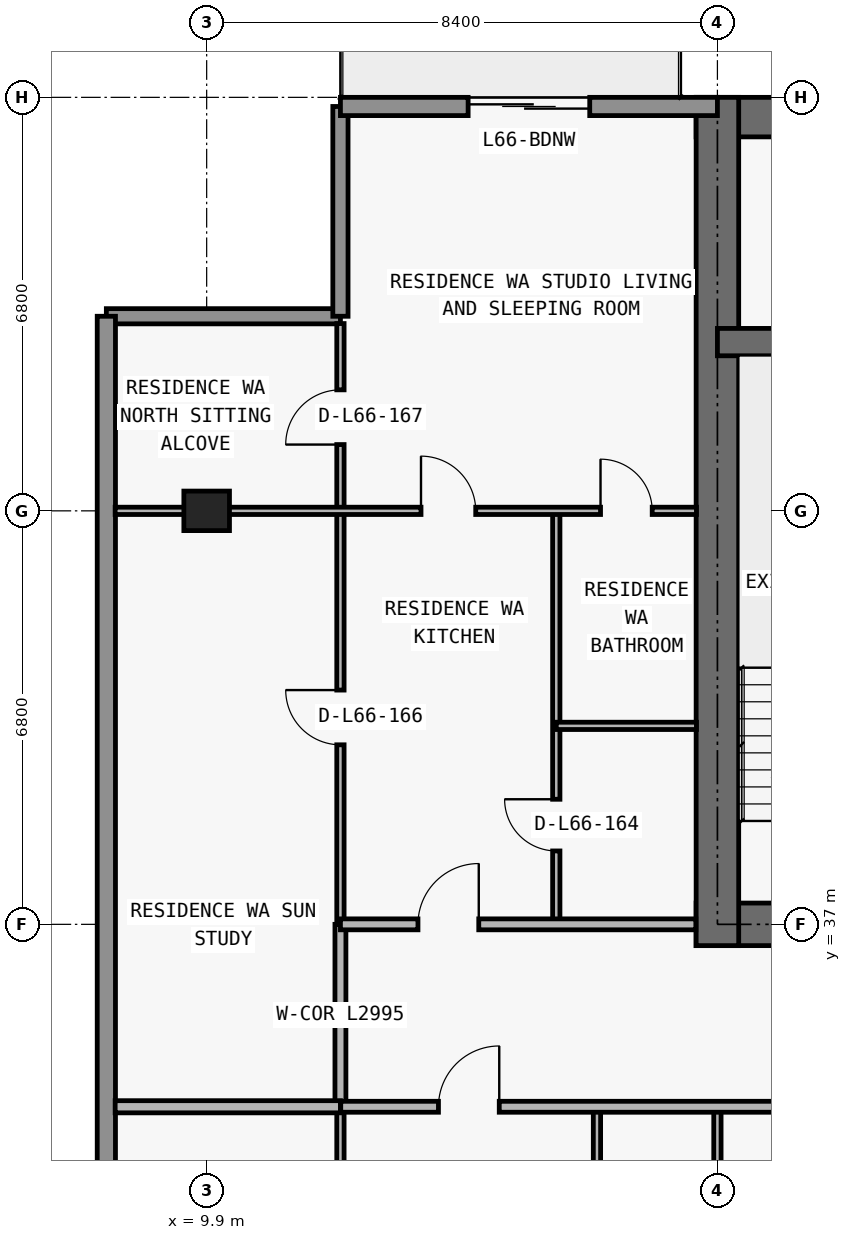
"""IFC4 building model, lengths in metres.
Left out: names, types, materials, properties, quantities, classifications, styles, units other than length and angle.
Written with IfcOpenShell. Run it as: python <this file> out.ifc"""

import sys

from ifc_helpers import new_model, si_unit, direction, frame, frame_2d, origin, origin_2d, place, context, subcontext, project, spatial, rectangle, extrude, element, fill, save


model = new_model("IFC4")
c1 = context("Model", 3, precision=1e-05, world=origin(), true_north=direction((0.0, 1.0)))
c2 = subcontext(c1, "Body", "Model", "MODEL_VIEW")
j1 = project(units=[si_unit("LENGTHUNIT", "METRE"), si_unit("PLANEANGLEUNIT", "RADIAN")], contexts=[c1])
p1 = place(None, origin())
s1 = spatial("IfcSite", under=j1, at=p1, CompositionType="ELEMENT")
p2 = place(p1, origin())
s2 = spatial("IfcBuilding", under=s1, at=p2, CompositionType="ELEMENT")
p3 = place(p2, frame((0.0, 0.0, 236.4)))
s3 = spatial("IfcBuildingStorey", under=s2, at=p3, CompositionType="ELEMENT", Elevation=236.4)
p4 = place(p3, frame((9.9, 43.8, 0.0), z_axis=(0.0, 0.0, 1.0), x_axis=(1.0, 0.0, 0.0)))
e1 = element("IfcColumn", 1, at=p4, inside=s3, PredefinedType="COLUMN", context=c2, shape_type="SweptSolid", body=[
    extrude(rectangle(XDim=0.75, YDim=0.65, at=origin_2d()), origin(), (0.0, 0.0, 1.0), 3.05),
])
p5 = place(p3, frame((17.95, 37.0, 0.0), z_axis=(0.0, 0.0, 1.0), x_axis=(1.0, 0.0, 0.0)))
e2 = element("IfcWall", 2, at=p5, inside=s3, PredefinedType="SHEAR", context=c2, shape_type="SweptSolid", body=[
    extrude(rectangle(XDim=41.9, YDim=0.7, at=frame_2d((20.95, 0.0))), origin(), (0.0, 0.0, 1.0), 3.05),
])
p6 = place(p5, frame((14.35, 0.0, 0.0)))
e3 = element("IfcOpeningElement", 3, at=p6, cuts=e2, PredefinedType="OPENING", context=c2, shape_type="SweptSolid", body=[
    extrude(rectangle(XDim=1.1, YDim=2.15, at=frame_2d((0.55, 1.075))), frame((0.0, 0.36, 0.0), z_axis=(0.0, -1.0, 0.0), x_axis=(1.0, 0.0, 0.0)), (0.0, 0.0, 1.0), 0.72),
])
p7 = place(p5, frame((6.2, 0.0, 0.0)))
e4 = element("IfcOpeningElement", 4, at=p7, cuts=e2, PredefinedType="OPENING", context=c2, shape_type="SweptSolid", body=[
    extrude(rectangle(XDim=1.05, YDim=2.15, at=frame_2d((0.525, 1.075))), frame((0.0, 0.36, 0.0), z_axis=(0.0, -1.0, 0.0), x_axis=(1.0, 0.0, 0.0)), (0.0, 0.0, 1.0), 0.72),
])
p8 = place(p5, frame((34.7, 0.0, 0.0)))
e5 = element("IfcOpeningElement", 5, at=p8, cuts=e2, PredefinedType="OPENING", context=c2, shape_type="SweptSolid", body=[
    extrude(rectangle(XDim=1.05, YDim=2.15, at=frame_2d((0.525, 1.075))), frame((0.0, 0.36, 0.0), z_axis=(0.0, -1.0, 0.0), x_axis=(1.0, 0.0, 0.0)), (0.0, 0.0, 1.0), 0.72),
])
p9 = place(p5, frame((10.812, 0.0, 0.0)))
e6 = element("IfcOpeningElement", 6, at=p9, cuts=e2, PredefinedType="OPENING", context=c2, shape_type="SweptSolid", body=[
    extrude(rectangle(XDim=1.05, YDim=2.15, at=frame_2d((0.525, 1.075))), frame((0.0, 0.36, 0.0), z_axis=(0.0, -1.0, 0.0), x_axis=(1.0, 0.0, 0.0)), (0.0, 0.0, 1.0), 0.72),
])
p10 = place(p5, frame((24.05, 0.0, 0.0)))
e7 = element("IfcOpeningElement", 7, at=p10, cuts=e2, PredefinedType="OPENING", context=c2, shape_type="SweptSolid", body=[
    extrude(rectangle(XDim=1.05, YDim=2.15, at=frame_2d((0.525, 1.075))), frame((0.0, 0.36, 0.0), z_axis=(0.0, -1.0, 0.0), x_axis=(1.0, 0.0, 0.0)), (0.0, 0.0, 1.0), 0.72),
])
p11 = place(p3, frame((17.95, 50.275, 0.0), z_axis=(0.0, 0.0, 1.0), x_axis=(1.0, 0.0, 0.0)))
e8 = element("IfcWall", 8, at=p11, inside=s3, PredefinedType="SHEAR", context=c2, shape_type="SweptSolid", body=[
    extrude(rectangle(XDim=41.9, YDim=0.65, at=frame_2d((20.95, 0.0))), origin(), (0.0, 0.0, 1.0), 3.05),
])
p12 = place(p3, frame((18.3, 36.65, 0.0), z_axis=(0.0, 0.0, 1.0), x_axis=(0.0, 1.0, 0.0)))
e9 = element("IfcWall", 9, at=p12, inside=s3, PredefinedType="SHEAR", context=c2, shape_type="SweptSolid", body=[
    extrude(rectangle(XDim=13.95, YDim=0.7, at=frame_2d((6.975, 0.0))), origin(), (0.0, 0.0, 1.0), 3.05),
])
p13 = place(p3, frame((18.3, 46.575, 0.0), z_axis=(0.0, 0.0, 1.0), x_axis=(1.0, 0.0, 0.0)))
e10 = element("IfcWall", 10, at=p13, inside=s3, PredefinedType="SHEAR", context=c2, shape_type="SweptSolid", body=[
    extrude(rectangle(XDim=41.2, YDim=0.45, at=frame_2d((20.6, 0.0))), origin(), (0.0, 0.0, 1.0), 3.05),
])
p14 = place(p13, frame((7.575, 0.0, 0.0)))
e11 = element("IfcOpeningElement", 11, at=p14, cuts=e10, PredefinedType="OPENING", context=c2, shape_type="SweptSolid", body=[
    extrude(rectangle(XDim=1.05, YDim=2.15, at=frame_2d((0.525, 1.075))), frame((0.0, 0.235, 0.0), z_axis=(0.0, -1.0, 0.0), x_axis=(1.0, 0.0, 0.0)), (0.0, 0.0, 1.0), 0.47),
])
p15 = place(p13, frame((32.625, 0.0, 0.0)))
e12 = element("IfcOpeningElement", 12, at=p15, cuts=e10, PredefinedType="OPENING", context=c2, shape_type="SweptSolid", body=[
    extrude(rectangle(XDim=1.05, YDim=2.15, at=frame_2d((0.525, 1.075))), frame((0.0, 0.235, 0.0), z_axis=(0.0, -1.0, 0.0), x_axis=(1.0, 0.0, 0.0)), (0.0, 0.0, 1.0), 0.47),
])
p16 = place(p3, frame((8.25, 47.0, 0.0), z_axis=(0.0, 0.0, 1.0), x_axis=(1.0, 0.0, 0.0)))
e13 = element("IfcWall", 13, at=p16, inside=s3, PredefinedType="ELEMENTEDWALL", context=c2, shape_type="SweptSolid", body=[
    extrude(rectangle(XDim=3.85, YDim=0.25, at=frame_2d((1.925, 0.0))), origin(), (0.0, 0.0, 1.0), 3.05),
])
p17 = place(p3, frame((12.1, 47.0, 0.0), z_axis=(0.0, 0.0, 1.0), x_axis=(0.0, 1.0, 0.0)))
e14 = element("IfcWall", 14, at=p17, inside=s3, PredefinedType="ELEMENTEDWALL", context=c2, shape_type="SweptSolid", body=[
    extrude(rectangle(XDim=3.45, YDim=0.25, at=frame_2d((1.725, 0.0))), origin(), (0.0, 0.0, 1.0), 3.05),
])
p18 = place(p3, frame((8.25, 30.15, 0.0), z_axis=(0.0, 0.0, 1.0), x_axis=(0.0, 1.0, 0.0)))
e15 = element("IfcWall", 15, at=p18, inside=s3, PredefinedType="STANDARD", context=c2, shape_type="SweptSolid", body=[
    extrude(rectangle(XDim=16.85, YDim=0.3, at=frame_2d((8.425, 0.0))), origin(), (0.0, 0.0, 1.0), 3.05),
])
p19 = place(p3, frame((12.1, 50.45, 0.0), z_axis=(0.0, 0.0, 1.0), x_axis=(1.0, 0.0, 0.0)))
e16 = element("IfcWall", 16, at=p19, inside=s3, PredefinedType="STANDARD", context=c2, shape_type="SweptSolid", body=[
    extrude(rectangle(XDim=6.2, YDim=0.3, at=frame_2d((3.1, 0.0))), origin(), (0.0, 0.0, 1.0), 3.05),
])
p20 = place(p19, frame((2.1, 0.0, 0.0)))
e17 = element("IfcOpeningElement", 17, at=p20, cuts=e16, PredefinedType="OPENING", context=c2, shape_type="SweptSolid", body=[
    extrude(rectangle(XDim=2.0, YDim=2.3, at=frame_2d((1.0, 1.15))), frame((0.0, 0.16, 0.0), z_axis=(0.0, -1.0, 0.0), x_axis=(1.0, 0.0, 0.0)), (0.0, 0.0, 1.0), 0.32),
])
p21 = place(p3, frame((12.1, 29.44, 0.0), z_axis=(0.0, 0.0, 1.0), x_axis=(0.0, 1.0, 0.0)))
e18 = element("IfcWall", 18, at=p21, inside=s3, PredefinedType="PARTITIONING", context=c2, shape_type="SweptSolid", body=[
    extrude(rectangle(XDim=4.56, YDim=0.12, at=frame_2d((2.28, 0.0))), origin(), (0.0, 0.0, 1.0), 2.578),
])
p22 = place(p3, frame((12.1, 34.005, 0.0), z_axis=(0.0, 0.0, 1.0), x_axis=(0.0, 1.0, 0.0)))
e19 = element("IfcWall", 19, at=p22, inside=s3, PredefinedType="PARTITIONING", context=c2, shape_type="SweptSolid", body=[
    extrude(rectangle(XDim=2.995, YDim=0.18, at=frame_2d((1.498, 0.0))), origin(), (0.0, 0.0, 1.0), 2.578),
])
p23 = place(p3, frame((12.1, 37.005, 0.0), z_axis=(0.0, 0.0, 1.0), x_axis=(0.0, 1.0, 0.0)))
e20 = element("IfcWall", 20, at=p23, inside=s3, PredefinedType="PARTITIONING", context=c2, shape_type="SweptSolid", body=[
    extrude(rectangle(XDim=9.875, YDim=0.12, at=frame_2d((4.938, 0.0))), origin(), (0.0, 0.0, 1.0), 2.578),
])
p24 = place(p23, frame((2.948, 0.0, 0.0)))
e21 = element("IfcOpeningElement", 21, at=p24, cuts=e20, PredefinedType="OPENING", context=c2, shape_type="SweptSolid", body=[
    extrude(rectangle(XDim=0.9, YDim=2.15, at=frame_2d((0.45, 1.075))), frame((0.0, 0.07, 0.0), z_axis=(0.0, -1.0, 0.0), x_axis=(1.0, 0.0, 0.0)), (0.0, 0.0, 1.0), 0.14),
])
p25 = place(p23, frame((7.885, 0.0, 0.0)))
e22 = element("IfcOpeningElement", 22, at=p25, cuts=e20, PredefinedType="OPENING", context=c2, shape_type="SweptSolid", body=[
    extrude(rectangle(XDim=0.9, YDim=2.15, at=frame_2d((0.45, 1.075))), frame((0.0, 0.07, 0.0), z_axis=(0.0, -1.0, 0.0), x_axis=(1.0, 0.0, 0.0)), (0.0, 0.0, 1.0), 0.14),
])
p26 = place(p3, frame((15.65, 37.0, 0.0), z_axis=(0.0, 0.0, 1.0), x_axis=(0.0, 1.0, 0.0)))
e23 = element("IfcWall", 23, at=p26, inside=s3, PredefinedType="PARTITIONING", context=c2, shape_type="SweptSolid", body=[
    extrude(rectangle(XDim=6.8, YDim=0.12, at=frame_2d((3.4, 0.0))), origin(), (0.0, 0.0, 1.0), 3.05),
])
p27 = place(p26, frame((1.207, 0.0, 0.0)))
e24 = element("IfcOpeningElement", 24, at=p27, cuts=e23, PredefinedType="OPENING", context=c2, shape_type="SweptSolid", body=[
    extrude(rectangle(XDim=0.85, YDim=2.1, at=frame_2d((0.425, 1.05))), frame((0.0, 0.07, 0.0), z_axis=(0.0, -1.0, 0.0), x_axis=(1.0, 0.0, 0.0)), (0.0, 0.0, 1.0), 0.14),
])
p28 = place(p3, frame((16.319, 29.44, 0.0), z_axis=(0.0, 0.0, 1.0), x_axis=(0.0, 1.0, 0.0)))
e25 = element("IfcWall", 25, at=p28, inside=s3, PredefinedType="PARTITIONING", context=c2, shape_type="SweptSolid", body=[
    extrude(rectangle(XDim=4.56, YDim=0.12, at=frame_2d((2.28, 0.0))), origin(), (0.0, 0.0, 1.0), 3.05),
])
p29 = place(p28, frame((1.855, 0.0, 0.0)))
e26 = element("IfcOpeningElement", 26, at=p29, cuts=e25, PredefinedType="OPENING", context=c2, shape_type="SweptSolid", body=[
    extrude(rectangle(XDim=0.85, YDim=2.1, at=frame_2d((0.425, 1.05))), frame((0.0, 0.07, 0.0), z_axis=(0.0, -1.0, 0.0), x_axis=(1.0, 0.0, 0.0)), (0.0, 0.0, 1.0), 0.14),
])
p30 = place(p3, frame((18.3, 29.44, 0.0), z_axis=(0.0, 0.0, 1.0), x_axis=(0.0, 1.0, 0.0)))
e27 = element("IfcWall", 27, at=p30, inside=s3, PredefinedType="PARTITIONING", context=c2, shape_type="SweptSolid", body=[
    extrude(rectangle(XDim=4.56, YDim=0.12, at=frame_2d((2.28, 0.0))), origin(), (0.0, 0.0, 1.0), 2.263),
])
p31 = place(p3, frame((8.395, 34.0, 0.0), z_axis=(0.0, 0.0, 1.0), x_axis=(1.0, 0.0, 0.0)))
e28 = element("IfcWall", 28, at=p31, inside=s3, PredefinedType="PARTITIONING", context=c2, shape_type="SweptSolid", body=[
    extrude(rectangle(XDim=3.705, YDim=0.2, at=frame_2d((1.853, 0.0))), origin(), (0.0, 0.0, 1.0), 3.05),
])
p32 = place(p3, frame((12.105, 34.0, 0.0), z_axis=(0.0, 0.0, 1.0), x_axis=(1.0, 0.0, 0.0)))
e29 = element("IfcWall", 29, at=p32, inside=s3, PredefinedType="PARTITIONING", context=c2, shape_type="SweptSolid", body=[
    extrude(rectangle(XDim=53.595, YDim=0.18, at=frame_2d((26.797, 0.0))), origin(), (0.0, 0.0, 1.0), 3.05),
])
p33 = place(p32, frame((1.607, 0.0, 0.0)))
e30 = element("IfcOpeningElement", 30, at=p33, cuts=e29, PredefinedType="OPENING", context=c2, shape_type="SweptSolid", body=[
    extrude(rectangle(XDim=1.0, YDim=2.2, at=frame_2d((0.5, 1.1))), frame((0.0, 0.1, 0.0), z_axis=(0.0, -1.0, 0.0), x_axis=(1.0, 0.0, 0.0)), (0.0, 0.0, 1.0), 0.2),
])
p34 = place(p32, frame((17.057, 0.0, 0.0)))
e31 = element("IfcOpeningElement", 31, at=p34, cuts=e29, PredefinedType="OPENING", context=c2, shape_type="SweptSolid", body=[
    extrude(rectangle(XDim=1.0, YDim=2.2, at=frame_2d((0.5, 1.1))), frame((0.0, 0.1, 0.0), z_axis=(0.0, -1.0, 0.0), x_axis=(1.0, 0.0, 0.0)), (0.0, 0.0, 1.0), 0.2),
])
p35 = place(p32, frame((25.242, 0.0, 0.0)))
e32 = element("IfcOpeningElement", 32, at=p35, cuts=e29, PredefinedType="OPENING", context=c2, shape_type="SweptSolid", body=[
    extrude(rectangle(XDim=1.0, YDim=2.2, at=frame_2d((0.5, 1.1))), frame((0.0, 0.1, 0.0), z_axis=(0.0, -1.0, 0.0), x_axis=(1.0, 0.0, 0.0)), (0.0, 0.0, 1.0), 0.2),
])
p36 = place(p32, frame((33.092, 0.0, 0.0)))
e33 = element("IfcOpeningElement", 33, at=p36, cuts=e29, PredefinedType="OPENING", context=c2, shape_type="SweptSolid", body=[
    extrude(rectangle(XDim=1.0, YDim=2.2, at=frame_2d((0.5, 1.1))), frame((0.0, 0.1, 0.0), z_axis=(0.0, -1.0, 0.0), x_axis=(1.0, 0.0, 0.0)), (0.0, 0.0, 1.0), 0.2),
])
p37 = place(p32, frame((41.705, 0.0, 0.0)))
e34 = element("IfcOpeningElement", 34, at=p37, cuts=e29, PredefinedType="OPENING", context=c2, shape_type="SweptSolid", body=[
    extrude(rectangle(XDim=1.0, YDim=2.2, at=frame_2d((0.5, 1.1))), frame((0.0, 0.1, 0.0), z_axis=(0.0, -1.0, 0.0), x_axis=(1.0, 0.0, 0.0)), (0.0, 0.0, 1.0), 0.2),
])
p38 = place(p3, frame((12.1, 37.0, 0.0), z_axis=(0.0, 0.0, 1.0), x_axis=(1.0, 0.0, 0.0)))
e35 = element("IfcWall", 35, at=p38, inside=s3, PredefinedType="PARTITIONING", context=c2, shape_type="SweptSolid", body=[
    extrude(rectangle(XDim=5.845, YDim=0.18, at=frame_2d((2.922, 0.0))), origin(), (0.0, 0.0, 1.0), 3.05),
])
p39 = place(p38, frame((1.275, 0.0, 0.0)))
e36 = element("IfcOpeningElement", 36, at=p39, cuts=e35, PredefinedType="OPENING", context=c2, shape_type="SweptSolid", body=[
    extrude(rectangle(XDim=1.0, YDim=2.2, at=frame_2d((0.5, 1.1))), frame((0.0, 0.1, 0.0), z_axis=(0.0, -1.0, 0.0), x_axis=(1.0, 0.0, 0.0)), (0.0, 0.0, 1.0), 0.2),
])
p40 = place(p3, frame((15.65, 40.264, 0.0), z_axis=(0.0, 0.0, 1.0), x_axis=(1.0, 0.0, 0.0)))
e37 = element("IfcWall", 37, at=p40, inside=s3, PredefinedType="PARTITIONING", context=c2, shape_type="SweptSolid", body=[
    extrude(rectangle(XDim=2.305, YDim=0.12, at=frame_2d((1.153, 0.0))), origin(), (0.0, 0.0, 1.0), 3.05),
])
p41 = place(p3, frame((8.395, 43.8, 0.0), z_axis=(0.0, 0.0, 1.0), x_axis=(1.0, 0.0, 0.0)))
e38 = element("IfcWall", 38, at=p41, inside=s3, PredefinedType="PARTITIONING", context=c2, shape_type="SweptSolid", body=[
    extrude(rectangle(XDim=9.56, YDim=0.12, at=frame_2d((4.78, 0.0))), origin(), (0.0, 0.0, 1.0), 2.418),
])
p42 = place(p41, frame((5.03, 0.0, 0.0)))
e39 = element("IfcOpeningElement", 39, at=p42, cuts=e38, PredefinedType="OPENING", context=c2, shape_type="SweptSolid", body=[
    extrude(rectangle(XDim=0.9, YDim=2.15, at=frame_2d((0.45, 1.075))), frame((0.0, 0.07, 0.0), z_axis=(0.0, -1.0, 0.0), x_axis=(1.0, 0.0, 0.0)), (0.0, 0.0, 1.0), 0.14),
])
p43 = place(p41, frame((7.982, 0.0, 0.0)))
e40 = element("IfcOpeningElement", 40, at=p43, cuts=e38, PredefinedType="OPENING", context=c2, shape_type="SweptSolid", body=[
    extrude(rectangle(XDim=0.85, YDim=2.1, at=frame_2d((0.425, 1.05))), frame((0.0, 0.07, 0.0), z_axis=(0.0, -1.0, 0.0), x_axis=(1.0, 0.0, 0.0)), (0.0, 0.0, 1.0), 0.14),
])
p44 = place(p20, origin())
e41 = element("IfcDoor", 41, at=p44, inside=s3, OperationType="DOUBLE_DOOR_SLIDING", PredefinedType="DOOR", context=c2, shape_type="SweptSolid", body=[
    extrude(rectangle(XDim=2.0, YDim=2.3, at=frame_2d((1.0, 1.15))), frame((0.0, 0.025, 0.0), z_axis=(0.0, -1.0, 0.0), x_axis=(1.0, 0.0, 0.0)), (0.0, 0.0, 1.0), 0.05),
])
fill(e17, e41)
p45 = place(p33, origin())
e42 = element("IfcDoor", 42, at=p45, inside=s3, OperationType="SINGLE_SWING_RIGHT", PredefinedType="DOOR", context=c2, shape_type="SweptSolid", body=[
    extrude(rectangle(XDim=1.0, YDim=2.2, at=frame_2d((0.5, 1.1))), frame((0.0, 0.025, 0.0), z_axis=(0.0, -1.0, 0.0), x_axis=(1.0, 0.0, 0.0)), (0.0, 0.0, 1.0), 0.05),
])
fill(e30, e42)
p46 = place(p39, origin())
e43 = element("IfcDoor", 43, at=p46, inside=s3, OperationType="SINGLE_SWING_RIGHT", PredefinedType="DOOR", context=c2, shape_type="SweptSolid", body=[
    extrude(rectangle(XDim=1.0, YDim=2.2, at=frame_2d((0.5, 1.1))), frame((0.0, 0.025, 0.0), z_axis=(0.0, -1.0, 0.0), x_axis=(1.0, 0.0, 0.0)), (0.0, 0.0, 1.0), 0.05),
])
fill(e36, e43)
p47 = place(p42, origin())
e44 = element("IfcDoor", 44, at=p47, inside=s3, OperationType="SINGLE_SWING_LEFT", PredefinedType="DOOR", context=c2, shape_type="SweptSolid", body=[
    extrude(rectangle(XDim=0.9, YDim=2.15, at=frame_2d((0.45, 1.075))), frame((0.0, 0.025, 0.0), z_axis=(0.0, -1.0, 0.0), x_axis=(1.0, 0.0, 0.0)), (0.0, 0.0, 1.0), 0.05),
])
fill(e39, e44)
p48 = place(p27, origin())
e45 = element("IfcDoor", 45, at=p48, inside=s3, OperationType="SINGLE_SWING_RIGHT", PredefinedType="DOOR", context=c2, shape_type="SweptSolid", body=[
    extrude(rectangle(XDim=0.85, YDim=2.1, at=frame_2d((0.425, 1.05))), frame((0.0, 0.025, 0.0), z_axis=(0.0, -1.0, 0.0), x_axis=(1.0, 0.0, 0.0)), (0.0, 0.0, 1.0), 0.05),
])
fill(e24, e45)
p49 = place(p43, origin())
e46 = element("IfcDoor", 46, at=p49, inside=s3, OperationType="SINGLE_SWING_LEFT", PredefinedType="DOOR", context=c2, shape_type="SweptSolid", body=[
    extrude(rectangle(XDim=0.85, YDim=2.1, at=frame_2d((0.425, 1.05))), frame((0.0, 0.025, 0.0), z_axis=(0.0, -1.0, 0.0), x_axis=(1.0, 0.0, 0.0)), (0.0, 0.0, 1.0), 0.05),
])
fill(e40, e46)
p50 = place(p24, origin())
e47 = element("IfcDoor", 47, at=p50, inside=s3, OperationType="SINGLE_SWING_RIGHT", PredefinedType="DOOR", context=c2, shape_type="SweptSolid", body=[
    extrude(rectangle(XDim=0.9, YDim=2.15, at=frame_2d((0.45, 1.075))), frame((0.0, 0.025, 0.0), z_axis=(0.0, -1.0, 0.0), x_axis=(1.0, 0.0, 0.0)), (0.0, 0.0, 1.0), 0.05),
])
fill(e21, e47)
p51 = place(p25, origin())
e48 = element("IfcDoor", 48, at=p51, inside=s3, OperationType="SINGLE_SWING_LEFT", PredefinedType="DOOR", context=c2, shape_type="SweptSolid", body=[
    extrude(rectangle(XDim=0.9, YDim=2.15, at=frame_2d((0.45, 1.075))), frame((0.0, 0.025, 0.0), z_axis=(0.0, -1.0, 0.0), x_axis=(1.0, 0.0, 0.0)), (0.0, 0.0, 1.0), 0.05),
])
fill(e22, e48)
save(model, sys.argv[1])
